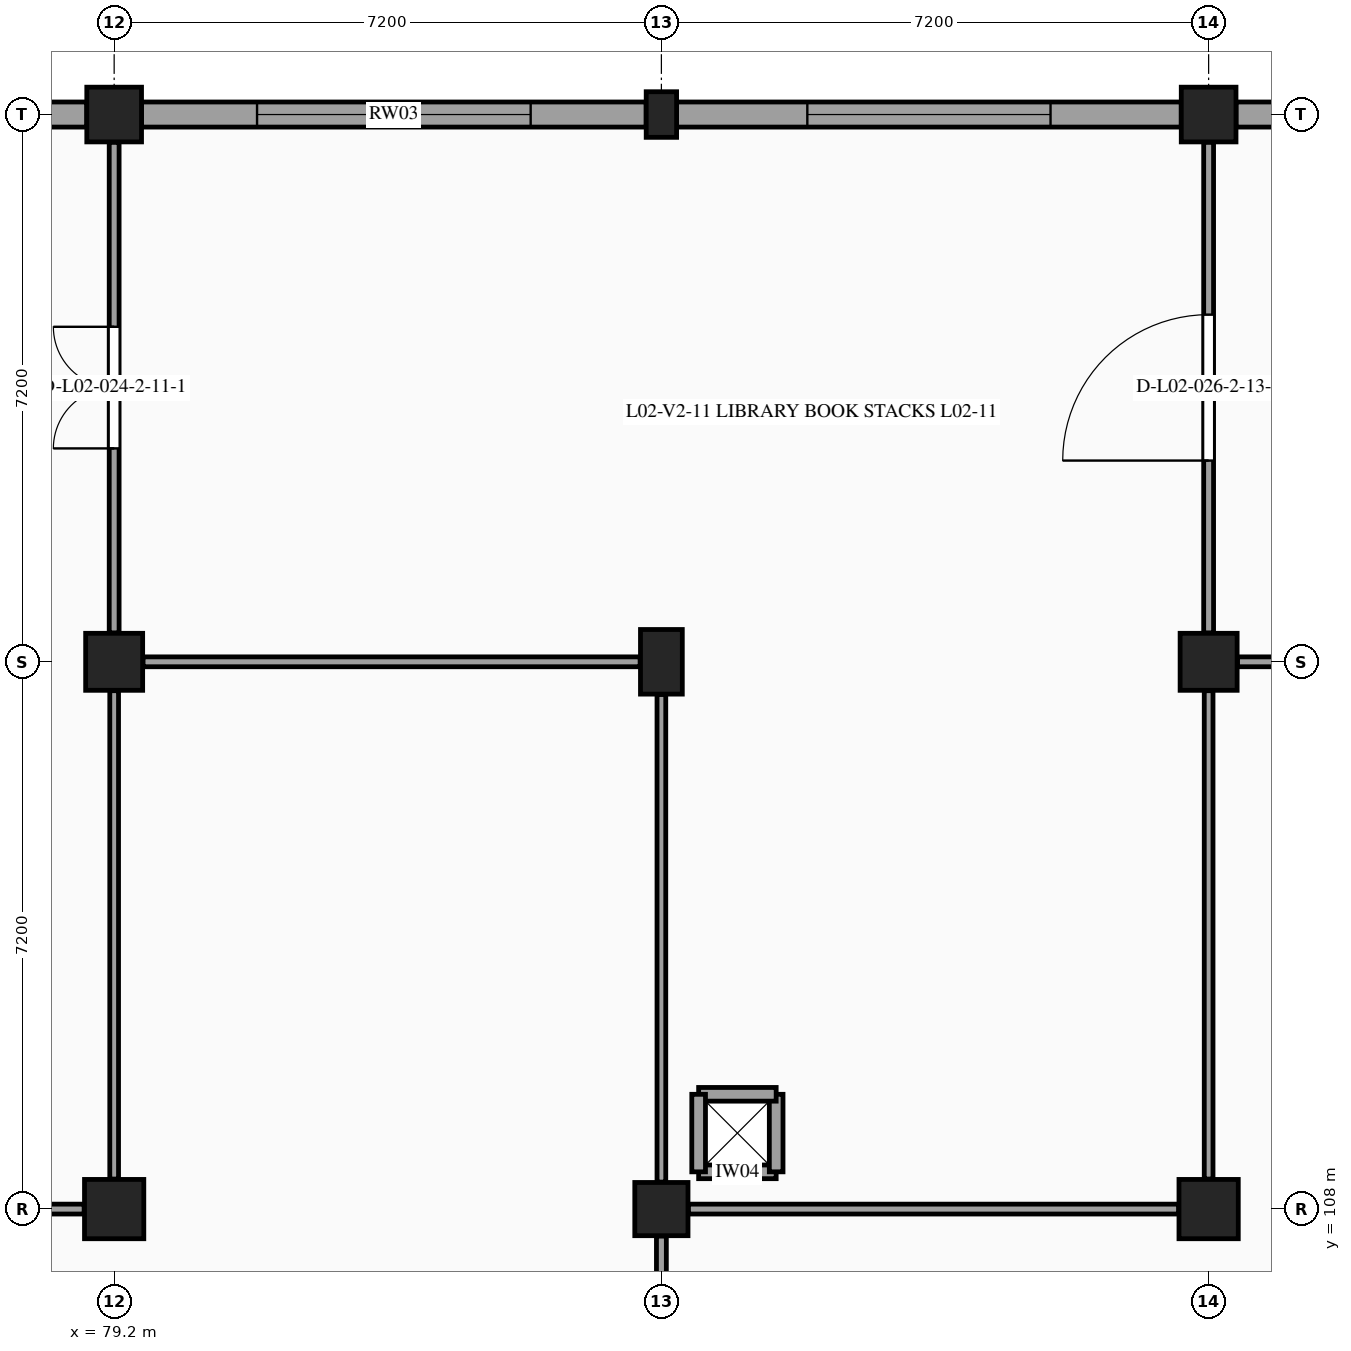
"""IFC4 building model, lengths in metres.
Left out: names, types, materials, properties, quantities, classifications, styles, units other than length and angle.
Written with IfcOpenShell. Run it as: python <this file> out.ifc"""

import sys

from ifc_helpers import new_model, si_unit, direction, frame, frame_2d, origin, origin_2d, place, context, subcontext, project, spatial, rectangle, extrude, element, fill, save


model = new_model("IFC4")
c1 = context("Model", 3, precision=1e-05, world=origin(), true_north=direction((0.0, 1.0)))
c2 = subcontext(c1, "Body", "Model", "MODEL_VIEW")
j1 = project(units=[si_unit("LENGTHUNIT", "METRE"), si_unit("PLANEANGLEUNIT", "RADIAN")], contexts=[c1])
p1 = place(None, origin())
s1 = spatial("IfcSite", under=j1, at=p1, CompositionType="ELEMENT")
p2 = place(p1, origin())
s2 = spatial("IfcBuilding", under=s1, at=p2, CompositionType="ELEMENT")
p3 = place(p2, frame((0.0, 0.0, 9.9)))
s3 = spatial("IfcBuildingStorey", under=s2, at=p3, CompositionType="ELEMENT", Elevation=9.9)
p4 = place(p3, frame((79.2, 108.0, 0.0), z_axis=(0.0, 0.0, 1.0), x_axis=(1.0, 0.0, 0.0)))
e1 = element("IfcColumn", 1, at=p4, inside=s3, PredefinedType="COLUMN", context=c2, shape_type="SweptSolid", body=[
    extrude(rectangle(XDim=0.78, YDim=0.78, at=origin_2d()), origin(), (0.0, 0.0, 1.0), 4.5),
])
p5 = place(p3, frame((79.2, 115.2, 0.0), z_axis=(0.0, 0.0, 1.0), x_axis=(1.0, 0.0, 0.0)))
e2 = element("IfcColumn", 2, at=p5, inside=s3, PredefinedType="COLUMN", context=c2, shape_type="SweptSolid", body=[
    extrude(rectangle(XDim=0.75, YDim=0.75, at=origin_2d()), origin(), (0.0, 0.0, 1.0), 4.5),
])
p6 = place(p3, frame((79.2, 122.4, 0.0), z_axis=(0.0, 0.0, 1.0), x_axis=(1.0, 0.0, 0.0)))
e3 = element("IfcColumn", 3, at=p6, inside=s3, PredefinedType="COLUMN", context=c2, shape_type="SweptSolid", body=[
    extrude(rectangle(XDim=0.72, YDim=0.72, at=origin_2d()), origin(), (0.0, 0.0, 1.0), 4.5),
])
p7 = place(p3, frame((86.4, 108.0, 0.0), z_axis=(0.0, 0.0, 1.0), x_axis=(1.0, 0.0, 0.0)))
e4 = element("IfcColumn", 4, at=p7, inside=s3, PredefinedType="COLUMN", context=c2, shape_type="SweptSolid", body=[
    extrude(rectangle(XDim=0.7, YDim=0.7, at=origin_2d()), origin(), (0.0, 0.0, 1.0), 4.5),
])
p8 = place(p3, frame((86.4, 115.2, 0.0), z_axis=(0.0, 0.0, 1.0), x_axis=(1.0, 0.0, 0.0)))
e5 = element("IfcColumn", 5, at=p8, inside=s3, PredefinedType="COLUMN", context=c2, shape_type="SweptSolid", body=[
    extrude(rectangle(XDim=0.55, YDim=0.85, at=origin_2d()), origin(), (0.0, 0.0, 1.0), 4.5),
])
p9 = place(p3, frame((86.4, 122.4, 0.0), z_axis=(0.0, 0.0, 1.0), x_axis=(1.0, 0.0, 0.0)))
e6 = element("IfcColumn", 6, at=p9, inside=s3, PredefinedType="PILASTER", context=c2, shape_type="SweptSolid", body=[
    extrude(rectangle(XDim=0.4, YDim=0.6, at=origin_2d()), origin(), (0.0, 0.0, 1.0), 4.5),
])
p10 = place(p3, frame((93.6, 108.0, 0.0), z_axis=(0.0, 0.0, 1.0), x_axis=(1.0, 0.0, 0.0)))
e7 = element("IfcColumn", 7, at=p10, inside=s3, PredefinedType="COLUMN", context=c2, shape_type="SweptSolid", body=[
    extrude(rectangle(XDim=0.78, YDim=0.78, at=origin_2d()), origin(), (0.0, 0.0, 1.0), 4.5),
])
p11 = place(p3, frame((93.6, 115.2, 0.0), z_axis=(0.0, 0.0, 1.0), x_axis=(1.0, 0.0, 0.0)))
e8 = element("IfcColumn", 8, at=p11, inside=s3, PredefinedType="COLUMN", context=c2, shape_type="SweptSolid", body=[
    extrude(rectangle(XDim=0.75, YDim=0.75, at=origin_2d()), origin(), (0.0, 0.0, 1.0), 4.5),
])
p12 = place(p3, frame((93.6, 122.4, 0.0), z_axis=(0.0, 0.0, 1.0), x_axis=(1.0, 0.0, 0.0)))
e9 = element("IfcColumn", 9, at=p12, inside=s3, PredefinedType="COLUMN", context=c2, shape_type="SweptSolid", body=[
    extrude(rectangle(XDim=0.72, YDim=0.72, at=origin_2d()), origin(), (0.0, 0.0, 1.0), 4.5),
])
p13 = place(p3, frame((72.2, 122.4, 0.0), z_axis=(0.0, 0.0, 1.0), x_axis=(1.0, 0.0, 0.0)))
e10 = element("IfcWall", 10, at=p13, inside=s3, PredefinedType="STANDARD", context=c2, shape_type="SweptSolid", body=[
    extrude(rectangle(XDim=6.64, YDim=0.33, at=frame_2d((3.32, 0.0))), origin(), (0.0, 0.0, 1.0), 3.47),
])
p14 = place(p13, frame((1.22, 0.0, 0.98)))
e11 = element("IfcOpeningElement", 11, at=p14, cuts=e10, PredefinedType="OPENING", context=c2, shape_type="SweptSolid", body=[
    extrude(rectangle(XDim=4.2, YDim=1.5, at=frame_2d((2.1, 0.75))), frame((0.0, 0.175, 0.0), z_axis=(0.0, -1.0, 0.0), x_axis=(1.0, 0.0, 0.0)), (0.0, 0.0, 1.0), 0.35),
])
p15 = place(p3, frame((79.56, 122.4, 0.0), z_axis=(0.0, 0.0, 1.0), x_axis=(1.0, 0.0, 0.0)))
e12 = element("IfcWall", 12, at=p15, inside=s3, PredefinedType="STANDARD", context=c2, shape_type="SweptSolid", body=[
    extrude(rectangle(XDim=6.64, YDim=0.33, at=frame_2d((3.32, 0.0))), origin(), (0.0, 0.0, 1.0), 3.47),
])
p16 = place(p15, frame((1.52, 0.0, 0.98)))
e13 = element("IfcOpeningElement", 13, at=p16, cuts=e12, PredefinedType="OPENING", context=c2, shape_type="SweptSolid", body=[
    extrude(rectangle(XDim=3.6, YDim=1.5, at=frame_2d((1.8, 0.75))), frame((0.0, 0.175, 0.0), z_axis=(0.0, -1.0, 0.0), x_axis=(1.0, 0.0, 0.0)), (0.0, 0.0, 1.0), 0.35),
])
p17 = place(p3, frame((86.6, 122.4, 0.0), z_axis=(0.0, 0.0, 1.0), x_axis=(1.0, 0.0, 0.0)))
e14 = element("IfcWall", 14, at=p17, inside=s3, PredefinedType="STANDARD", context=c2, shape_type="SweptSolid", body=[
    extrude(rectangle(XDim=6.64, YDim=0.33, at=frame_2d((3.32, 0.0))), origin(), (0.0, 0.0, 1.0), 3.47),
])
p18 = place(p17, frame((1.72, 0.0, 0.98)))
e15 = element("IfcOpeningElement", 15, at=p18, cuts=e14, PredefinedType="OPENING", context=c2, shape_type="SweptSolid", body=[
    extrude(rectangle(XDim=3.2, YDim=1.45, at=frame_2d((1.6, 0.725))), frame((0.0, 0.175, 0.0), z_axis=(0.0, -1.0, 0.0), x_axis=(1.0, 0.0, 0.0)), (0.0, 0.0, 1.0), 0.35),
])
p19 = place(p3, frame((93.96, 122.4, 0.0), z_axis=(0.0, 0.0, 1.0), x_axis=(1.0, 0.0, 0.0)))
e16 = element("IfcWall", 16, at=p19, inside=s3, PredefinedType="STANDARD", context=c2, shape_type="SweptSolid", body=[
    extrude(rectangle(XDim=6.64, YDim=0.33, at=frame_2d((3.32, 0.0))), origin(), (0.0, 0.0, 1.0), 3.47),
])
p20 = place(p19, frame((1.92, 0.0, 0.98)))
e17 = element("IfcOpeningElement", 17, at=p20, cuts=e16, PredefinedType="OPENING", context=c2, shape_type="SweptSolid", body=[
    extrude(rectangle(XDim=2.8, YDim=1.45, at=frame_2d((1.4, 0.725))), frame((0.0, 0.175, 0.0), z_axis=(0.0, -1.0, 0.0), x_axis=(1.0, 0.0, 0.0)), (0.0, 0.0, 1.0), 0.35),
])
for number, where, z_axis, x_axis in (
    (18, (86.89, 108.49, 0.0), (0.0, 0.0, 1.0), (1.0, 0.0, 0.0)),
    (19, (87.91, 108.49, 0.0), (0.0, 0.0, 1.0), (0.0, 1.0, 0.0)),
    (20, (87.91, 109.51, 0.0), (0.0, 0.0, 1.0), (-1.0, 0.0, 0.0)),
    (21, (86.89, 109.51, 0.0), (0.0, 0.0, 1.0), (0.0, -1.0, 0.0)),
):
    element("IfcWall", number, at=place(p3, frame(where, z_axis=z_axis, x_axis=x_axis)), inside=s3, PredefinedType="PARTITIONING", context=c2, shape_type="SweptSolid", body=[
        extrude(rectangle(XDim=1.02, YDim=0.18, at=frame_2d((0.51, 0.0))), origin(), (0.0, 0.0, 1.0), 4.225),
    ])
p21 = place(p3, frame((72.355, 108.0, 0.0), z_axis=(0.0, 0.0, 1.0), x_axis=(1.0, 0.0, 0.0)))
e22 = element("IfcWall", 22, at=p21, inside=s3, PredefinedType="PARTITIONING", context=c2, shape_type="SweptSolid", body=[
    extrude(rectangle(XDim=6.45, YDim=0.13, at=frame_2d((3.225, 0.0))), origin(), (0.0, 0.0, 1.0), 3.485),
])
p22 = place(p3, frame((79.2, 108.395, 0.0), z_axis=(0.0, 0.0, 1.0), x_axis=(0.0, 1.0, 0.0)))
e23 = element("IfcWall", 23, at=p22, inside=s3, PredefinedType="PARTITIONING", context=c2, shape_type="SweptSolid", body=[
    extrude(rectangle(XDim=6.425, YDim=0.115, at=frame_2d((3.212, 0.0))), origin(), (0.0, 0.0, 1.0), 3.535),
])
p23 = place(p3, frame((79.2, 115.58, 0.0), z_axis=(0.0, 0.0, 1.0), x_axis=(0.0, 1.0, 0.0)))
e24 = element("IfcWall", 24, at=p23, inside=s3, PredefinedType="PARTITIONING", context=c2, shape_type="SweptSolid", body=[
    extrude(rectangle(XDim=6.455, YDim=0.13, at=frame_2d((3.228, 0.0))), origin(), (0.0, 0.0, 1.0), 3.53),
])
p24 = place(p23, frame((2.427, 0.0, 0.0)))
e25 = element("IfcOpeningElement", 25, at=p24, cuts=e24, PredefinedType="OPENING", context=c2, shape_type="SweptSolid", body=[
    extrude(rectangle(XDim=1.6, YDim=2.2, at=frame_2d((0.8, 1.1))), frame((0.0, 0.075, 0.0), z_axis=(0.0, -1.0, 0.0), x_axis=(1.0, 0.0, 0.0)), (0.0, 0.0, 1.0), 0.15),
])
p25 = place(p3, frame((86.4, 101.165, 0.0), z_axis=(0.0, 0.0, 1.0), x_axis=(0.0, 1.0, 0.0)))
e26 = element("IfcWall", 26, at=p25, inside=s3, PredefinedType="PARTITIONING", context=c2, shape_type="SweptSolid", body=[
    extrude(rectangle(XDim=6.48, YDim=0.13, at=frame_2d((3.24, 0.0))), origin(), (0.0, 0.0, 1.0), 3.54),
])
p26 = place(p25, frame((2.765, 0.0, 0.0)))
e27 = element("IfcOpeningElement", 27, at=p26, cuts=e26, PredefinedType="OPENING", context=c2, shape_type="SweptSolid", body=[
    extrude(rectangle(XDim=0.95, YDim=2.15, at=frame_2d((0.475, 1.075))), frame((0.0, 0.075, 0.0), z_axis=(0.0, -1.0, 0.0), x_axis=(1.0, 0.0, 0.0)), (0.0, 0.0, 1.0), 0.15),
])
p27 = place(p3, frame((86.4, 108.355, 0.0), z_axis=(0.0, 0.0, 1.0), x_axis=(0.0, 1.0, 0.0)))
e28 = element("IfcWall", 28, at=p27, inside=s3, PredefinedType="PARTITIONING", context=c2, shape_type="SweptSolid", body=[
    extrude(rectangle(XDim=6.415, YDim=0.115, at=frame_2d((3.208, 0.0))), origin(), (0.0, 0.0, 1.0), 3.535),
])
p28 = place(p3, frame((79.58, 115.2, 0.0), z_axis=(0.0, 0.0, 1.0), x_axis=(1.0, 0.0, 0.0)))
e29 = element("IfcWall", 29, at=p28, inside=s3, PredefinedType="PARTITIONING", context=c2, shape_type="SweptSolid", body=[
    extrude(rectangle(XDim=6.54, YDim=0.13, at=frame_2d((3.27, 0.0))), origin(), (0.0, 0.0, 1.0), 3.5),
])
p29 = place(p3, frame((86.755, 108.0, 0.0), z_axis=(0.0, 0.0, 1.0), x_axis=(1.0, 0.0, 0.0)))
e30 = element("IfcWall", 30, at=p29, inside=s3, PredefinedType="PARTITIONING", context=c2, shape_type="SweptSolid", body=[
    extrude(rectangle(XDim=6.45, YDim=0.13, at=frame_2d((3.225, 0.0))), origin(), (0.0, 0.0, 1.0), 3.505),
])
p30 = place(p3, frame((93.6, 108.395, 0.0), z_axis=(0.0, 0.0, 1.0), x_axis=(0.0, 1.0, 0.0)))
e31 = element("IfcWall", 31, at=p30, inside=s3, PredefinedType="PARTITIONING", context=c2, shape_type="SweptSolid", body=[
    extrude(rectangle(XDim=6.425, YDim=0.115, at=frame_2d((3.212, 0.0))), origin(), (0.0, 0.0, 1.0), 3.535),
])
p31 = place(p3, frame((93.6, 115.58, 0.0), z_axis=(0.0, 0.0, 1.0), x_axis=(0.0, 1.0, 0.0)))
e32 = element("IfcWall", 32, at=p31, inside=s3, PredefinedType="PARTITIONING", context=c2, shape_type="SweptSolid", body=[
    extrude(rectangle(XDim=6.455, YDim=0.13, at=frame_2d((3.228, 0.0))), origin(), (0.0, 0.0, 1.0), 3.53),
])
p32 = place(p31, frame((2.268, 0.0, 0.0)))
e33 = element("IfcOpeningElement", 33, at=p32, cuts=e32, PredefinedType="OPENING", context=c2, shape_type="SweptSolid", body=[
    extrude(rectangle(XDim=1.92, YDim=2.35, at=frame_2d((0.96, 1.175))), frame((0.0, 0.075, 0.0), z_axis=(0.0, -1.0, 0.0), x_axis=(1.0, 0.0, 0.0)), (0.0, 0.0, 1.0), 0.15),
])
p33 = place(p3, frame((93.98, 115.2, 0.0), z_axis=(0.0, 0.0, 1.0), x_axis=(1.0, 0.0, 0.0)))
e34 = element("IfcWall", 34, at=p33, inside=s3, PredefinedType="PARTITIONING", context=c2, shape_type="SweptSolid", body=[
    extrude(rectangle(XDim=6.54, YDim=0.13, at=frame_2d((3.27, 0.0))), origin(), (0.0, 0.0, 1.0), 3.525),
])
p34 = place(p16, origin())
e35 = element("IfcWindow", 35, at=p34, inside=s3, PartitioningType="SINGLE_PANEL", PredefinedType="WINDOW", context=c2, shape_type="SweptSolid", body=[
    extrude(rectangle(XDim=3.6, YDim=1.5, at=frame_2d((1.8, 0.75))), frame((0.0, -0.03, 0.0), z_axis=(0.0, -1.0, 0.0), x_axis=(1.0, 0.0, 0.0)), (0.0, 0.0, 1.0), 0.06),
])
fill(e13, e35)
p35 = place(p18, origin())
e36 = element("IfcWindow", 36, at=p35, inside=s3, PartitioningType="SINGLE_PANEL", PredefinedType="WINDOW", context=c2, shape_type="SweptSolid", body=[
    extrude(rectangle(XDim=3.2, YDim=1.45, at=frame_2d((1.6, 0.725))), frame((0.0, -0.03, 0.0), z_axis=(0.0, -1.0, 0.0), x_axis=(1.0, 0.0, 0.0)), (0.0, 0.0, 1.0), 0.06),
])
fill(e15, e36)
p36 = place(p24, origin())
e37 = element("IfcDoor", 37, at=p36, inside=s3, OperationType="DOUBLE_DOOR_SINGLE_SWING", PredefinedType="DOOR", context=c2, shape_type="SweptSolid", body=[
    extrude(rectangle(XDim=1.6, YDim=2.2, at=frame_2d((0.8, 1.1))), frame((0.0, 0.025, 0.0), z_axis=(0.0, -1.0, 0.0), x_axis=(1.0, 0.0, 0.0)), (0.0, 0.0, 1.0), 0.05),
])
fill(e25, e37)
p37 = place(p32, origin())
e38 = element("IfcDoor", 38, at=p37, inside=s3, OperationType="SINGLE_SWING_LEFT", PredefinedType="DOOR", context=c2, shape_type="SweptSolid", body=[
    extrude(rectangle(XDim=1.92, YDim=2.35, at=frame_2d((0.96, 1.175))), frame((0.0, 0.025, 0.0), z_axis=(0.0, -1.0, 0.0), x_axis=(1.0, 0.0, 0.0)), (0.0, 0.0, 1.0), 0.05),
])
fill(e33, e38)
save(model, sys.argv[1])
